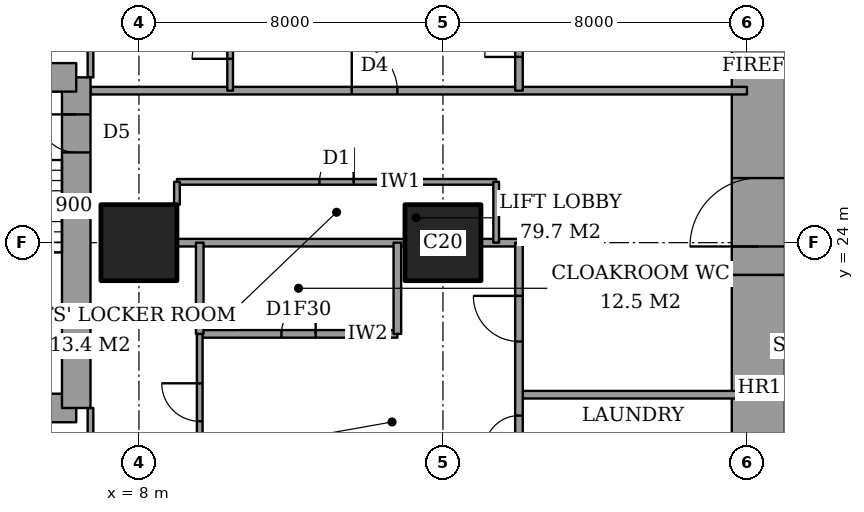
"""IFC4 building model, lengths in metres.
Left out: names, types, materials, properties, quantities, classifications, styles, units other than length and angle.
Written with IfcOpenShell. Run it as: python <this file> out.ifc"""

import sys

from ifc_helpers import new_model, si_unit, direction, frame, frame_2d, origin, origin_2d, place, context, subcontext, project, spatial, rectangle, extrude, element, fill, save


model = new_model("IFC4")
c1 = context("Model", 3, precision=1e-05, world=origin(), true_north=direction((0.0, 1.0)))
c2 = subcontext(c1, "Body", "Model", "MODEL_VIEW")
j1 = project(units=[si_unit("LENGTHUNIT", "METRE"), si_unit("PLANEANGLEUNIT", "RADIAN")], contexts=[c1])
p1 = place(None, origin())
s1 = spatial("IfcSite", under=j1, at=p1, CompositionType="ELEMENT")
p2 = place(p1, origin())
s2 = spatial("IfcBuilding", under=s1, at=p2, CompositionType="ELEMENT")
p3 = place(p2, frame((0.0, 0.0, 161.0)))
s3 = spatial("IfcBuildingStorey", under=s2, at=p3, CompositionType="ELEMENT", Elevation=161.0)
for number, where, z_axis, x_axis in (
    (1, (8.0, 24.0, 0.0), (0.0, 0.0, 1.0), (1.0, 0.0, 0.0)),
    (2, (16.0, 24.0, 0.0), (0.0, 0.0, 1.0), (1.0, 0.0, 0.0)),
):
    element("IfcColumn", number, at=place(p3, frame(where, z_axis=z_axis, x_axis=x_axis)), inside=s3, PredefinedType="COLUMN", context=c2, shape_type="SweptSolid", body=[
        extrude(rectangle(XDim=2.0, YDim=2.0, at=origin_2d()), origin(), (0.0, 0.0, 1.0), 3.6),
    ])
p4 = place(p3, frame((24.3, 13.0, 0.0), z_axis=(0.0, 0.0, 1.0), x_axis=(0.0, 1.0, 0.0)))
e3 = element("IfcWall", 3, at=p4, inside=s3, PredefinedType="SHEAR", context=c2, shape_type="SweptSolid", body=[
    extrude(rectangle(XDim=10.15, YDim=1.4, at=frame_2d((5.075, 0.0))), origin(), (0.0, 0.0, 1.0), 3.6),
])
p5 = place(p3, frame((24.3, 23.15, 0.0), z_axis=(0.0, 0.0, 1.0), x_axis=(0.0, 1.0, 0.0)))
e4 = element("IfcWall", 4, at=p5, inside=s3, PredefinedType="SHEAR", context=c2, shape_type="SweptSolid", body=[
    extrude(rectangle(XDim=11.85, YDim=1.4, at=frame_2d((5.925, 0.0))), origin(), (0.0, 0.0, 1.0), 3.6),
])
p6 = place(p5, frame((0.75, 0.0, 0.0)))
e5 = element("IfcOpeningElement", 5, at=p6, cuts=e4, PredefinedType="OPENING", context=c2, shape_type="SweptSolid", body=[
    extrude(rectangle(XDim=1.8, YDim=2.4, at=frame_2d((0.9, 1.2))), frame((0.0, 0.71, 0.0), z_axis=(0.0, -1.0, 0.0), x_axis=(1.0, 0.0, 0.0)), (0.0, 0.0, 1.0), 1.42),
])
p7 = place(p3, frame((1.9, 19.65, 0.0), z_axis=(0.0, 0.0, 1.0), x_axis=(1.0, 0.0, 0.0)))
e6 = element("IfcWall", 6, at=p7, inside=s3, PredefinedType="SHEAR", context=c2, shape_type="SweptSolid", body=[
    extrude(rectangle(XDim=4.45, YDim=0.75, at=frame_2d((2.225, 0.0))), origin(), (0.0, 0.0, 1.0), 3.6),
])
p8 = place(p3, frame((6.35, 19.65, 0.0), z_axis=(0.0, 0.0, 1.0), x_axis=(0.0, 1.0, 0.0)))
e7 = element("IfcWall", 7, at=p8, inside=s3, PredefinedType="SHEAR", context=c2, shape_type="SweptSolid", body=[
    extrude(rectangle(XDim=8.7, YDim=0.75, at=frame_2d((4.35, 0.0))), origin(), (0.0, 0.0, 1.0), 3.6),
])
p9 = place(p8, frame((6.725, 0.0, 0.0)))
e8 = element("IfcOpeningElement", 8, at=p9, cuts=e7, PredefinedType="OPENING", context=c2, shape_type="SweptSolid", body=[
    extrude(rectangle(XDim=1.0, YDim=2.1, at=frame_2d((0.5, 1.05))), frame((0.0, 0.385, 0.0), z_axis=(0.0, -1.0, 0.0), x_axis=(1.0, 0.0, 0.0)), (0.0, 0.0, 1.0), 0.77),
])
p10 = place(p3, frame((6.35, 28.35, 0.0), z_axis=(0.0, 0.0, 1.0), x_axis=(-1.0, 0.0, 0.0)))
e9 = element("IfcWall", 9, at=p10, inside=s3, PredefinedType="SHEAR", context=c2, shape_type="SweptSolid", body=[
    extrude(rectangle(XDim=4.45, YDim=0.75, at=frame_2d((2.225, 0.0))), origin(), (0.0, 0.0, 1.0), 3.6),
])
p11 = place(p3, frame((18.0, 20.0, 0.0), z_axis=(0.0, 0.0, 1.0), x_axis=(1.0, 0.0, 0.0)))
e10 = element("IfcWall", 10, at=p11, inside=s3, PredefinedType="PARTITIONING", context=c2, shape_type="SweptSolid", body=[
    extrude(rectangle(XDim=6.0, YDim=0.2, at=frame_2d((3.0, 0.0))), origin(), (0.0, 0.0, 1.0), 3.35),
])
p12 = place(p3, frame((9.6, 21.6, 0.0), z_axis=(0.0, 0.0, 1.0), x_axis=(1.0, 0.0, 0.0)))
e11 = element("IfcWall", 11, at=p12, inside=s3, PredefinedType="PARTITIONING", context=c2, shape_type="SweptSolid", body=[
    extrude(rectangle(XDim=5.2, YDim=0.2, at=frame_2d((2.6, 0.0))), origin(), (0.0, 0.0, 1.0), 3.35),
])
p13 = place(p12, frame((2.15, 0.0, 0.0)))
e12 = element("IfcOpeningElement", 12, at=p13, cuts=e11, PredefinedType="OPENING", context=c2, shape_type="SweptSolid", body=[
    extrude(rectangle(XDim=0.9, YDim=2.1, at=frame_2d((0.45, 1.05))), frame((0.0, 0.11, 0.0), z_axis=(0.0, -1.0, 0.0), x_axis=(1.0, 0.0, 0.0)), (0.0, 0.0, 1.0), 0.22),
])
p14 = place(p3, frame((9.0, 24.0, 0.0), z_axis=(0.0, 0.0, 1.0), x_axis=(1.0, 0.0, 0.0)))
e13 = element("IfcWall", 13, at=p14, inside=s3, PredefinedType="PARTITIONING", context=c2, shape_type="SweptSolid", body=[
    extrude(rectangle(XDim=6.0, YDim=0.2, at=frame_2d((3.0, 0.0))), origin(), (0.0, 0.0, 1.0), 3.35),
])
p15 = place(p3, frame((17.0, 24.0, 0.0), z_axis=(0.0, 0.0, 1.0), x_axis=(1.0, 0.0, 0.0)))
e14 = element("IfcWall", 14, at=p15, inside=s3, PredefinedType="PARTITIONING", context=c2, shape_type="SweptSolid", body=[
    extrude(rectangle(XDim=1.0, YDim=0.2, at=frame_2d((0.5, 0.0))), origin(), (0.0, 0.0, 1.0), 3.35),
])
p16 = place(p3, frame((9.0, 25.6, 0.0), z_axis=(0.0, 0.0, 1.0), x_axis=(1.0, 0.0, 0.0)))
e15 = element("IfcWall", 15, at=p16, inside=s3, PredefinedType="PARTITIONING", context=c2, shape_type="SweptSolid", body=[
    extrude(rectangle(XDim=8.4, YDim=0.15, at=frame_2d((4.2, 0.0))), origin(), (0.0, 0.0, 1.0), 3.35),
])
p17 = place(p16, frame((3.75, 0.0, 0.0)))
e16 = element("IfcOpeningElement", 16, at=p17, cuts=e15, PredefinedType="OPENING", context=c2, shape_type="SweptSolid", body=[
    extrude(rectangle(XDim=0.9, YDim=2.1, at=frame_2d((0.45, 1.05))), frame((0.0, 0.085, 0.0), z_axis=(0.0, -1.0, 0.0), x_axis=(1.0, 0.0, 0.0)), (0.0, 0.0, 1.0), 0.17),
])
p18 = place(p3, frame((6.725, 28.0, 0.0), z_axis=(0.0, 0.0, 1.0), x_axis=(1.0, 0.0, 0.0)))
e17 = element("IfcWall", 17, at=p18, inside=s3, PredefinedType="PARTITIONING", context=c2, shape_type="SweptSolid", body=[
    extrude(rectangle(XDim=17.275, YDim=0.2, at=frame_2d((8.637, 0.0))), origin(), (0.0, 0.0, 1.0), 3.35),
])
p19 = place(p18, frame((6.875, 0.0, 0.0)))
e18 = element("IfcOpeningElement", 18, at=p19, cuts=e17, PredefinedType="OPENING", context=c2, shape_type="SweptSolid", body=[
    extrude(rectangle(XDim=1.2, YDim=2.4, at=frame_2d((0.6, 1.2))), frame((0.0, 0.11, 0.0), z_axis=(0.0, -1.0, 0.0), x_axis=(1.0, 0.0, 0.0)), (0.0, 0.0, 1.0), 0.22),
])
p20 = place(p3, frame((6.725, 17.2, 0.0), z_axis=(0.0, 0.0, 1.0), x_axis=(0.0, 1.0, 0.0)))
e19 = element("IfcWall", 19, at=p20, inside=s3, PredefinedType="PARTITIONING", context=c2, shape_type="SweptSolid", body=[
    extrude(rectangle(XDim=2.45, YDim=0.15, at=frame_2d((1.225, 0.0))), origin(), (0.0, 0.0, 1.0), 3.35),
])
p21 = place(p20, frame((0.538, 0.0, 0.0)))
e20 = element("IfcOpeningElement", 20, at=p21, cuts=e19, PredefinedType="OPENING", context=c2, shape_type="SweptSolid", body=[
    extrude(rectangle(XDim=1.0, YDim=2.1, at=frame_2d((0.5, 1.05))), frame((0.0, 0.085, 0.0), z_axis=(0.0, -1.0, 0.0), x_axis=(1.0, 0.0, 0.0)), (0.0, 0.0, 1.0), 0.17),
])
p22 = place(p3, frame((6.725, 28.35, 0.0), z_axis=(0.0, 0.0, 1.0), x_axis=(0.0, 1.0, 0.0)))
e21 = element("IfcWall", 21, at=p22, inside=s3, PredefinedType="PARTITIONING", context=c2, shape_type="SweptSolid", body=[
    extrude(rectangle(XDim=2.45, YDim=0.15, at=frame_2d((1.225, 0.0))), origin(), (0.0, 0.0, 1.0), 3.35),
])
p23 = place(p22, frame((0.962, 0.0, 0.0)))
e22 = element("IfcOpeningElement", 22, at=p23, cuts=e21, PredefinedType="OPENING", context=c2, shape_type="SweptSolid", body=[
    extrude(rectangle(XDim=0.9, YDim=2.1, at=frame_2d((0.45, 1.05))), frame((0.0, 0.085, 0.0), z_axis=(0.0, -1.0, 0.0), x_axis=(1.0, 0.0, 0.0)), (0.0, 0.0, 1.0), 0.17),
])
p24 = place(p3, frame((9.0, 25.0, 0.0), z_axis=(0.0, 0.0, 1.0), x_axis=(0.0, 1.0, 0.0)))
e23 = element("IfcWall", 23, at=p24, inside=s3, PredefinedType="PARTITIONING", context=c2, shape_type="SweptSolid", body=[
    extrude(rectangle(XDim=0.6, YDim=0.15, at=frame_2d((0.3, 0.0))), origin(), (0.0, 0.0, 1.0), 3.35),
])
p25 = place(p3, frame((9.6, 21.6, 0.0), z_axis=(0.0, 0.0, 1.0), x_axis=(0.0, 1.0, 0.0)))
e24 = element("IfcWall", 24, at=p25, inside=s3, PredefinedType="PARTITIONING", context=c2, shape_type="SweptSolid", body=[
    extrude(rectangle(XDim=2.4, YDim=0.2, at=frame_2d((1.2, 0.0))), origin(), (0.0, 0.0, 1.0), 3.35),
])
p26 = place(p3, frame((9.6, 10.6, 0.0), z_axis=(0.0, 0.0, 1.0), x_axis=(0.0, 1.0, 0.0)))
e25 = element("IfcWall", 25, at=p26, inside=s3, PredefinedType="PARTITIONING", context=c2, shape_type="SweptSolid", body=[
    extrude(rectangle(XDim=11.0, YDim=0.15, at=frame_2d((5.5, 0.0))), origin(), (0.0, 0.0, 1.0), 3.35),
])
p27 = place(p26, frame((8.7, 0.0, 0.0)))
e26 = element("IfcOpeningElement", 26, at=p27, cuts=e25, PredefinedType="OPENING", context=c2, shape_type="SweptSolid", body=[
    extrude(rectangle(XDim=1.0, YDim=2.1, at=frame_2d((0.5, 1.05))), frame((0.0, 0.085, 0.0), z_axis=(0.0, -1.0, 0.0), x_axis=(1.0, 0.0, 0.0)), (0.0, 0.0, 1.0), 0.17),
])
p28 = place(p3, frame((10.4, 28.0, 0.0), z_axis=(0.0, 0.0, 1.0), x_axis=(0.0, 1.0, 0.0)))
e27 = element("IfcWall", 27, at=p28, inside=s3, PredefinedType="PARTITIONING", context=c2, shape_type="SweptSolid", body=[
    extrude(rectangle(XDim=9.4, YDim=0.15, at=frame_2d((4.7, 0.0))), origin(), (0.0, 0.0, 1.0), 3.35),
])
p29 = place(p28, frame((0.837, 0.0, 0.0)))
e28 = element("IfcOpeningElement", 28, at=p29, cuts=e27, PredefinedType="OPENING", context=c2, shape_type="SweptSolid", body=[
    extrude(rectangle(XDim=1.0, YDim=2.1, at=frame_2d((0.5, 1.05))), frame((0.0, 0.085, 0.0), z_axis=(0.0, -1.0, 0.0), x_axis=(1.0, 0.0, 0.0)), (0.0, 0.0, 1.0), 0.17),
])
p30 = place(p3, frame((14.8, 21.6, 0.0), z_axis=(0.0, 0.0, 1.0), x_axis=(0.0, 1.0, 0.0)))
e29 = element("IfcWall", 29, at=p30, inside=s3, PredefinedType="PARTITIONING", context=c2, shape_type="SweptSolid", body=[
    extrude(rectangle(XDim=2.4, YDim=0.2, at=frame_2d((1.2, 0.0))), origin(), (0.0, 0.0, 1.0), 3.35),
])
p31 = place(p3, frame((17.4, 24.0, 0.0), z_axis=(0.0, 0.0, 1.0), x_axis=(0.0, 1.0, 0.0)))
e30 = element("IfcWall", 30, at=p31, inside=s3, PredefinedType="PARTITIONING", context=c2, shape_type="SweptSolid", body=[
    extrude(rectangle(XDim=1.6, YDim=0.15, at=frame_2d((0.8, 0.0))), origin(), (0.0, 0.0, 1.0), 3.35),
])
p32 = place(p3, frame((18.0, 18.0, 0.0), z_axis=(0.0, 0.0, 1.0), x_axis=(0.0, 1.0, 0.0)))
e31 = element("IfcWall", 31, at=p32, inside=s3, PredefinedType="PARTITIONING", context=c2, shape_type="SweptSolid", body=[
    extrude(rectangle(XDim=6.0, YDim=0.2, at=frame_2d((3.0, 0.0))), origin(), (0.0, 0.0, 1.0), 3.35),
])
p33 = place(p32, frame((3.4, 0.0, 0.0)))
e32 = element("IfcOpeningElement", 32, at=p33, cuts=e31, PredefinedType="OPENING", context=c2, shape_type="SweptSolid", body=[
    extrude(rectangle(XDim=1.2, YDim=2.4, at=frame_2d((0.6, 1.2))), frame((0.0, 0.11, 0.0), z_axis=(0.0, -1.0, 0.0), x_axis=(1.0, 0.0, 0.0)), (0.0, 0.0, 1.0), 0.22),
])
p34 = place(p32, frame((0.55, 0.0, 0.0)))
e33 = element("IfcOpeningElement", 33, at=p34, cuts=e31, PredefinedType="OPENING", context=c2, shape_type="SweptSolid", body=[
    extrude(rectangle(XDim=0.9, YDim=2.1, at=frame_2d((0.45, 1.05))), frame((0.0, 0.11, 0.0), z_axis=(0.0, -1.0, 0.0), x_axis=(1.0, 0.0, 0.0)), (0.0, 0.0, 1.0), 0.22),
])
p35 = place(p3, frame((18.0, 28.0, 0.0), z_axis=(0.0, 0.0, 1.0), x_axis=(0.0, 1.0, 0.0)))
e34 = element("IfcWall", 34, at=p35, inside=s3, PredefinedType="PARTITIONING", context=c2, shape_type="SweptSolid", body=[
    extrude(rectangle(XDim=5.5, YDim=0.2, at=frame_2d((2.75, 0.0))), origin(), (0.0, 0.0, 1.0), 3.35),
])
p36 = place(p35, frame((0.887, 0.0, 0.0)))
e35 = element("IfcOpeningElement", 35, at=p36, cuts=e34, PredefinedType="OPENING", context=c2, shape_type="SweptSolid", body=[
    extrude(rectangle(XDim=0.9, YDim=2.1, at=frame_2d((0.45, 1.05))), frame((0.0, 0.11, 0.0), z_axis=(0.0, -1.0, 0.0), x_axis=(1.0, 0.0, 0.0)), (0.0, 0.0, 1.0), 0.22),
])
p37 = place(p27, origin())
e36 = element("IfcDoor", 36, at=p37, inside=s3, OperationType="SINGLE_SWING_LEFT", PredefinedType="DOOR", context=c2, shape_type="SweptSolid", body=[
    extrude(rectangle(XDim=1.0, YDim=2.1, at=frame_2d((0.5, 1.05))), frame((0.0, 0.025, 0.0), z_axis=(0.0, -1.0, 0.0), x_axis=(1.0, 0.0, 0.0)), (0.0, 0.0, 1.0), 0.05),
])
fill(e26, e36)
p38 = place(p13, origin())
e37 = element("IfcDoor", 37, at=p38, inside=s3, OperationType="SINGLE_SWING_LEFT", PredefinedType="DOOR", context=c2, shape_type="SweptSolid", body=[
    extrude(rectangle(XDim=0.9, YDim=2.1, at=frame_2d((0.45, 1.05))), frame((0.0, 0.025, 0.0), z_axis=(0.0, -1.0, 0.0), x_axis=(1.0, 0.0, 0.0)), (0.0, 0.0, 1.0), 0.05),
])
fill(e12, e37)
p39 = place(p33, origin())
e38 = element("IfcDoor", 38, at=p39, inside=s3, OperationType="SINGLE_SWING_LEFT", PredefinedType="DOOR", context=c2, shape_type="SweptSolid", body=[
    extrude(rectangle(XDim=1.2, YDim=2.4, at=frame_2d((0.6, 1.2))), frame((0.0, 0.025, 0.0), z_axis=(0.0, -1.0, 0.0), x_axis=(1.0, 0.0, 0.0)), (0.0, 0.0, 1.0), 0.05),
])
fill(e32, e38)
p40 = place(p34, origin())
e39 = element("IfcDoor", 39, at=p40, inside=s3, OperationType="SINGLE_SWING_RIGHT", PredefinedType="DOOR", context=c2, shape_type="SweptSolid", body=[
    extrude(rectangle(XDim=0.9, YDim=2.1, at=frame_2d((0.45, 1.05))), frame((0.0, 0.025, 0.0), z_axis=(0.0, -1.0, 0.0), x_axis=(1.0, 0.0, 0.0)), (0.0, 0.0, 1.0), 0.05),
])
fill(e33, e39)
p41 = place(p29, origin())
e40 = element("IfcDoor", 40, at=p41, inside=s3, OperationType="SINGLE_SWING_RIGHT", PredefinedType="DOOR", context=c2, shape_type="SweptSolid", body=[
    extrude(rectangle(XDim=1.0, YDim=2.1, at=frame_2d((0.5, 1.05))), frame((0.0, 0.025, 0.0), z_axis=(0.0, -1.0, 0.0), x_axis=(1.0, 0.0, 0.0)), (0.0, 0.0, 1.0), 0.05),
])
fill(e28, e40)
p42 = place(p19, origin())
e41 = element("IfcDoor", 41, at=p42, inside=s3, OperationType="SINGLE_SWING_RIGHT", PredefinedType="DOOR", context=c2, shape_type="SweptSolid", body=[
    extrude(rectangle(XDim=1.2, YDim=2.4, at=frame_2d((0.6, 1.2))), frame((0.0, 0.025, 0.0), z_axis=(0.0, -1.0, 0.0), x_axis=(1.0, 0.0, 0.0)), (0.0, 0.0, 1.0), 0.05),
])
fill(e18, e41)
p43 = place(p36, origin())
e42 = element("IfcDoor", 42, at=p43, inside=s3, OperationType="SINGLE_SWING_RIGHT", PredefinedType="DOOR", context=c2, shape_type="SweptSolid", body=[
    extrude(rectangle(XDim=0.9, YDim=2.1, at=frame_2d((0.45, 1.05))), frame((0.0, 0.025, 0.0), z_axis=(0.0, -1.0, 0.0), x_axis=(1.0, 0.0, 0.0)), (0.0, 0.0, 1.0), 0.05),
])
fill(e35, e42)
p44 = place(p17, origin())
e43 = element("IfcDoor", 43, at=p44, inside=s3, OperationType="SINGLE_SWING_LEFT", PredefinedType="DOOR", context=c2, shape_type="SweptSolid", body=[
    extrude(rectangle(XDim=0.9, YDim=2.1, at=frame_2d((0.45, 1.05))), frame((0.0, 0.025, 0.0), z_axis=(0.0, -1.0, 0.0), x_axis=(1.0, 0.0, 0.0)), (0.0, 0.0, 1.0), 0.05),
])
fill(e16, e43)
p45 = place(p6, origin())
e44 = element("IfcDoor", 44, at=p45, inside=s3, OperationType="DOUBLE_DOOR_DOUBLE_SWING", PredefinedType="DOOR", context=c2, shape_type="SweptSolid", body=[
    extrude(rectangle(XDim=1.8, YDim=2.4, at=frame_2d((0.9, 1.2))), frame((0.0, 0.025, 0.0), z_axis=(0.0, -1.0, 0.0), x_axis=(1.0, 0.0, 0.0)), (0.0, 0.0, 1.0), 0.05),
])
fill(e5, e44)
p46 = place(p9, origin())
e45 = element("IfcDoor", 45, at=p46, inside=s3, OperationType="SINGLE_SWING_LEFT", PredefinedType="DOOR", context=c2, shape_type="SweptSolid", body=[
    extrude(rectangle(XDim=1.0, YDim=2.1, at=frame_2d((0.5, 1.05))), frame((0.0, 0.025, 0.0), z_axis=(0.0, -1.0, 0.0), x_axis=(1.0, 0.0, 0.0)), (0.0, 0.0, 1.0), 0.05),
])
fill(e8, e45)
save(model, sys.argv[1])
